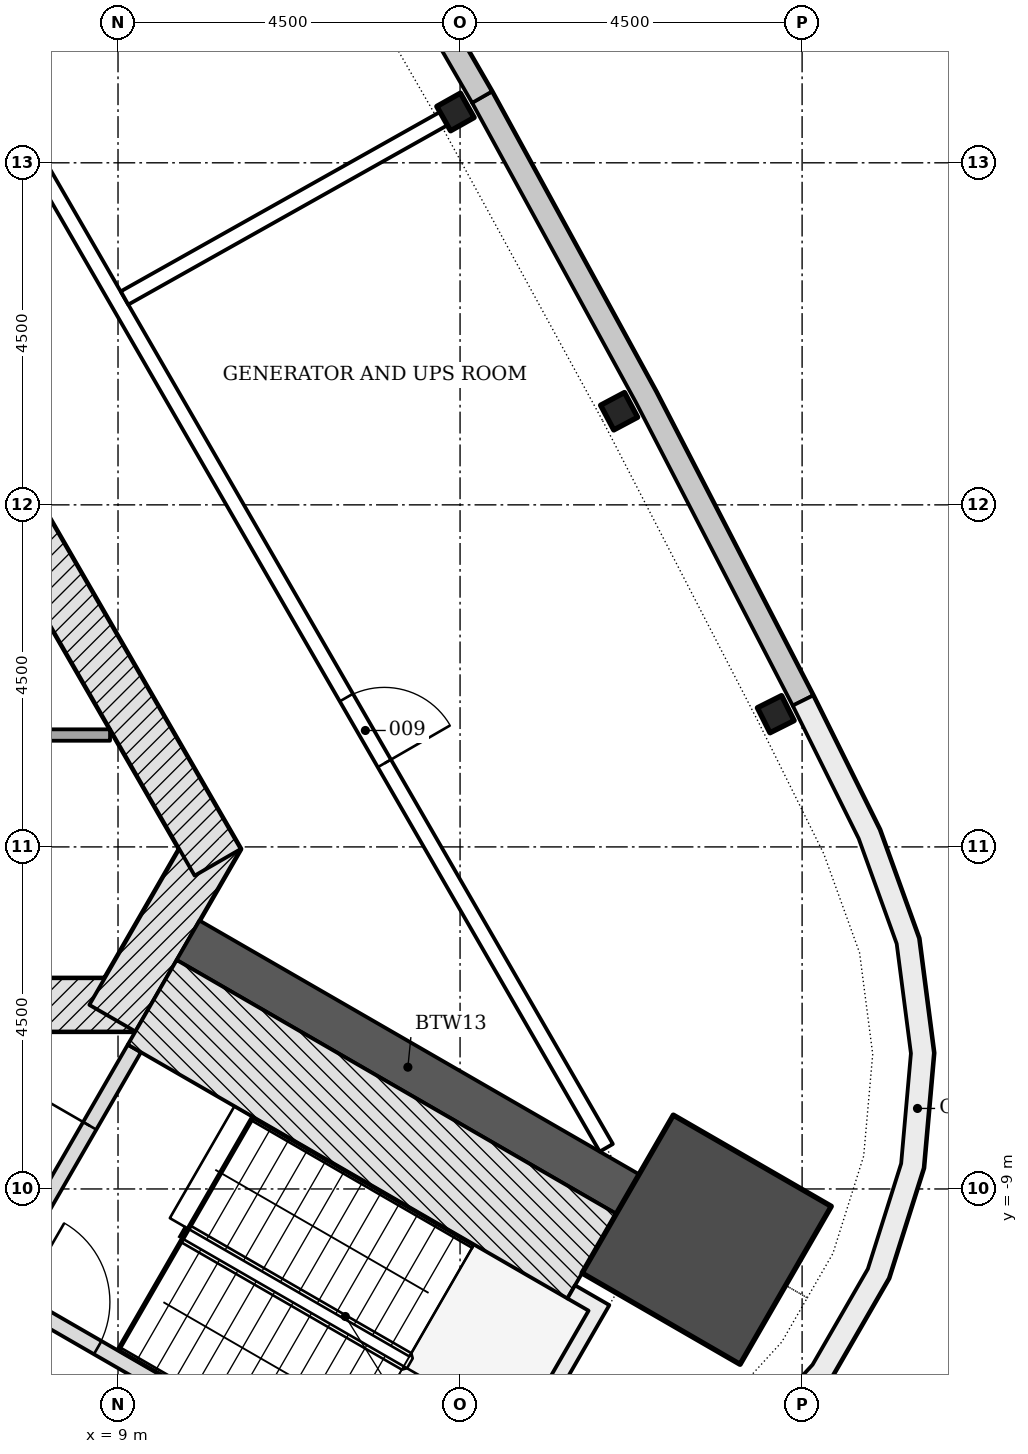
"""IFC4 building model, lengths in metres.
Left out: names, types, materials, properties, quantities, classifications, styles, units other than length and angle.
Written with IfcOpenShell. Run it as: python <this file> out.ifc"""

import sys

from ifc_helpers import new_model, si_unit, direction, frame, frame_2d, origin, origin_2d, place, context, subcontext, project, spatial, polyline, rectangle, i_section, outline, extrude, element, fill, save


model = new_model("IFC4")
c1 = context("Model", 3, precision=1e-05, world=origin(), true_north=direction((0.0, 1.0)))
c2 = subcontext(c1, "Body", "Model", "MODEL_VIEW")
j1 = project(units=[si_unit("LENGTHUNIT", "METRE"), si_unit("PLANEANGLEUNIT", "RADIAN")], contexts=[c1])
p1 = place(None, origin())
s1 = spatial("IfcSite", under=j1, at=p1, CompositionType="ELEMENT")
p2 = place(p1, origin())
s2 = spatial("IfcBuilding", under=s1, at=p2, CompositionType="ELEMENT")
p3 = place(p2, frame((0.0, 0.0, 284.1)))
s3 = spatial("IfcBuildingStorey", under=s2, at=p3, CompositionType="ELEMENT", Elevation=284.1)
p4 = place(p3, frame((-9.229, -6.578, -0.25), z_axis=(0.0, 0.0, 1.0), x_axis=(1.0, 0.0, 0.0)))
e1 = element("IfcWall", 1, at=p4, inside=s3, PredefinedType="SHEAR", context=c2, shape_type="SweptSolid", body=[
    extrude(rectangle(XDim=18.458, YDim=0.7, at=frame_2d((9.229, 0.0))), origin(), (0.0, 0.0, 1.0), 4.5),
])
p5 = place(p4, frame((8.7, 0.0, 0.25)))
e2 = element("IfcOpeningElement", 2, at=p5, cuts=e1, PredefinedType="OPENING", context=c2, shape_type="SweptSolid", body=[
    extrude(rectangle(XDim=1.0, YDim=2.1, at=frame_2d((0.5, 1.05))), frame((0.0, 0.36, 0.0), z_axis=(0.0, -1.0, 0.0), x_axis=(1.0, 0.0, 0.0)), (0.0, 0.0, 1.0), 0.72),
])
p6 = place(p4, frame((3.99, 0.0, 0.25)))
e3 = element("IfcOpeningElement", 3, at=p6, cuts=e1, PredefinedType="OPENING", context=c2, shape_type="SweptSolid", body=[
    extrude(rectangle(XDim=0.9, YDim=2.1, at=frame_2d((0.45, 1.05))), frame((0.0, 0.36, 0.0), z_axis=(0.0, -1.0, 0.0), x_axis=(1.0, 0.0, 0.0)), (0.0, 0.0, 1.0), 0.72),
])
p7 = place(p4, frame((13.539, 0.0, 0.25)))
e4 = element("IfcOpeningElement", 4, at=p7, cuts=e1, PredefinedType="OPENING", context=c2, shape_type="SweptSolid", body=[
    extrude(rectangle(XDim=0.9, YDim=2.1, at=frame_2d((0.45, 1.05))), frame((0.0, 0.36, 0.0), z_axis=(0.0, -1.0, 0.0), x_axis=(1.0, 0.0, 0.0)), (0.0, 0.0, 1.0), 0.72),
])
p8 = place(p3, frame((8.926, -6.753, -0.25), z_axis=(0.0, 0.0, 1.0), x_axis=(0.500042739161, 0.866000726912, 0.0)))
e5 = element("IfcWall", 5, at=p8, inside=s3, PredefinedType="SHEAR", context=c2, shape_type="SweptSolid", body=[
    extrude(rectangle(XDim=2.771, YDim=0.7, at=frame_2d((1.386, 0.0))), origin(), (0.0, 0.0, 1.0), 4.5),
])
p9 = place(p3, frame((10.311, -4.703, -0.25), z_axis=(0.0, 0.0, 1.0), x_axis=(-0.500001446645, 0.866024568562, 0.0)))
e6 = element("IfcWall", 6, at=p9, inside=s3, PredefinedType="SHEAR", context=c2, shape_type="SweptSolid", body=[
    extrude(rectangle(XDim=18.458, YDim=0.7, at=frame_2d((9.229, 0.0))), origin(), (0.0, 0.0, 1.0), 4.5),
])
p10 = place(p3, frame((9.922, -5.728, -0.25), z_axis=(0.0, 0.0, 1.0), x_axis=(0.866032176823, -0.499988268569, 0.0)))
e7 = element("IfcWall", 7, at=p10, inside=s3, PredefinedType="SHEAR", context=c2, shape_type="SweptSolid", body=[
    extrude(rectangle(XDim=6.678, YDim=0.6, at=frame_2d((3.339, 0.0))), origin(), (0.0, 0.0, 1.0), 4.5),
])
p11 = place(p3, frame((16.745, -9.667, -0.25), z_axis=(0.0, 0.0, 1.0), x_axis=(0.866025403784, -0.5, 0.0)))
e8 = element("IfcColumn", 8, at=p11, inside=s3, PredefinedType="COLUMN", context=c2, shape_type="SweptSolid", body=[
    extrude(rectangle(XDim=2.4, YDim=2.4, at=origin_2d()), origin(), (0.0, 0.0, 1.0), 4.5),
])
for number, where, z_axis, x_axis in (
    (9, (17.654, -2.754, -0.25), (0.0, 0.0, 1.0), (-0.449, 0.894, 0.0)),
    (10, (15.593, 1.232, -0.25), (0.0, 0.0, 1.0), (-0.47, 0.883, 0.0)),
    (11, (13.44, 5.169, -0.25), (0.0, 0.0, 1.0), (-0.49, 0.872, 0.0)),
):
    element("IfcColumn", number, at=place(p3, frame(where, z_axis=z_axis, x_axis=x_axis)), inside=s3, PredefinedType="COLUMN", context=c2, shape_type="SweptSolid", body=[
        extrude(i_section(OverallWidth=0.368, OverallDepth=0.356, WebThickness=0.011, FlangeThickness=0.018, FilletRadius=0.015, at=origin_2d()), origin(), (0.0, 0.0, 1.0), 4.5),
    ])
p12 = place(p3, origin())
e12 = element("IfcWall", 12, at=p12, inside=s3, PredefinedType="NOTDEFINED", context=c2, shape_type="SweptSolid", body=[
    extrude(outline(polyline([(18.145, -2.507), (16.078, 1.49), (13.919, 5.438), (13.656, 5.294), (15.813, 1.349), (17.878, -2.645), (18.145, -2.507)])), origin(), (0.0, 0.0, 1.0), 4.25),
])
p13 = place(p3, origin())
e13 = element("IfcWall", 13, at=p13, inside=s3, PredefinedType="NOTDEFINED", context=c2, shape_type="SweptSolid", body=[
    extrude(outline(polyline([(13.919, 5.438), (11.669, 9.335), (11.409, 9.185), (13.659, 5.288), (13.919, 5.438)])), origin(), (0.0, 0.0, 1.0), 1.2),
])
p14 = place(p3, origin())
e14 = element("IfcWall", 14, at=p14, inside=s3, PredefinedType="NOTDEFINED", context=c2, shape_type="SweptSolid", body=[
    extrude(outline(polyline([(11.244, -14.46), (13.211, -14.336), (14.708, -14.069), (16.111, -13.485), (17.355, -12.611), (18.381, -11.49), (19.141, -10.174), (19.599, -8.724), (19.733, -7.21), (19.538, -5.703), (19.021, -4.273), (18.145, -2.507), (17.876, -2.64), (18.745, -4.391), (19.244, -5.774), (19.432, -7.216), (19.303, -8.665), (18.865, -10.052), (18.138, -11.312), (17.156, -12.385), (15.965, -13.22), (14.623, -13.779), (13.176, -14.038), (11.225, -14.161), (11.244, -14.46)])), origin(), (0.0, 0.0, 1.0), 4.25),
])
p15 = place(p3, frame((1.071, -3.028, 0.0), z_axis=(0.0, 0.0, 1.0), x_axis=(1.0, 0.0, 0.0)))
e15 = element("IfcWall", 15, at=p15, inside=s3, PredefinedType="PARTITIONING", context=c2, shape_type="SweptSolid", body=[
    extrude(rectangle(XDim=7.824, YDim=0.15, at=frame_2d((3.912, 0.0))), origin(), (0.0, 0.0, 1.0), 4.25),
])
p16 = place(p3, frame((7.44, -10.226, -0.25), z_axis=(0.0, 0.0, 1.0), x_axis=(0.500022077904, 0.866012656725, 0.0)))
e16 = element("IfcWall", 16, at=p16, inside=s3, PredefinedType="SHEAR", context=c2, shape_type="SweptSolid", body=[
    extrude(rectangle(XDim=3.55, YDim=0.2, at=frame_2d((1.775, 0.0))), origin(), (0.0, 0.0, 1.0), 4.5),
])
p17 = place(p16, frame((1.175, 0.0, 0.25)))
e17 = element("IfcOpeningElement", 17, at=p17, cuts=e16, PredefinedType="OPENING", context=c2, shape_type="SweptSolid", body=[
    extrude(rectangle(XDim=1.2, YDim=2.1, at=frame_2d((0.6, 1.05))), frame((0.0, 0.11, 0.0), z_axis=(0.0, -1.0, 0.0), x_axis=(1.0, 0.0, 0.0)), (0.0, 0.0, 1.0), 0.22),
])
p18 = place(p3, frame((7.304, -10.262, -0.25), z_axis=(0.0, 0.0, 1.0), x_axis=(0.866026594901, -0.49999793692, 0.0)))
e18 = element("IfcWall", 18, at=p18, inside=s3, PredefinedType="SHEAR", context=c2, shape_type="SweptSolid", body=[
    extrude(rectangle(XDim=5.6, YDim=0.2, at=frame_2d((2.8, 0.0))), origin(), (0.0, 0.0, 1.0), 4.5),
])
p19 = place(p18, frame((0.45, 0.0, 0.25)))
e19 = element("IfcOpeningElement", 19, at=p19, cuts=e18, PredefinedType="OPENING", context=c2, shape_type="SweptSolid", body=[
    extrude(rectangle(XDim=1.2, YDim=2.1, at=frame_2d((0.6, 1.05))), frame((0.0, 0.11, 0.0), z_axis=(0.0, -1.0, 0.0), x_axis=(1.0, 0.0, 0.0)), (0.0, 0.0, 1.0), 0.22),
])
p20 = place(p3, frame((9.45, -6.545, -0.25), z_axis=(0.0, 0.0, 1.0), x_axis=(0.866016347338, -0.500015685897, 0.0)))
e20 = element("IfcWall", 20, at=p20, inside=s3, PredefinedType="SHEAR", context=c2, shape_type="SweptSolid", body=[
    extrude(rectangle(XDim=6.678, YDim=1.286, at=frame_2d((3.339, 0.0))), origin(), (0.0, 0.0, 1.0), 4.5),
])
p21 = place(p3, frame((0.0, 0.0, -0.25)))
e21 = element("IfcWall", 21, at=p21, inside=s3, PredefinedType="SHEAR", context=c2, shape_type="SweptSolid", body=[
    extrude(outline(polyline([(12.104, -13.149), (14.289, -12.563), (15.464, -10.528), (15.013, -10.268), (14.913, -10.441), (15.191, -10.601), (14.157, -12.392), (12.132, -12.934), (12.204, -12.976), (12.204, -12.976), (12.204, -12.976), (12.204, -12.976), (12.204, -12.976), (12.204, -12.976), (12.204, -12.976), (12.204, -12.976), (12.204, -12.976), (12.204, -12.976), (12.204, -12.976), (12.204, -12.976), (12.204, -12.976), (12.204, -12.976), (12.204, -12.976), (12.204, -12.976), (12.204, -12.976), (12.104, -13.149)])), origin(), (0.0, 0.0, 1.0), 4.5),
])
p22 = place(p3, frame((5.455, 8.808, 0.0), z_axis=(0.0, 0.0, 1.0), x_axis=(0.499996641012, -0.866027343088, 0.0)))
e22 = element("IfcWall", 22, at=p22, inside=s3, PredefinedType="PARTITIONING", context=c2, shape_type="SweptSolid", body=[
    extrude(rectangle(XDim=19.937, YDim=0.2, at=frame_2d((9.969, 0.0))), origin(), (0.0, 0.0, 1.0), 3.702),
])
p23 = place(p22, frame((13.097, 0.0, 0.0)))
e23 = element("IfcOpeningElement", 23, at=p23, cuts=e22, PredefinedType="OPENING", context=c2, shape_type="SweptSolid", body=[
    extrude(rectangle(XDim=1.0, YDim=2.1, at=frame_2d((0.5, 1.05))), frame((0.0, 0.11, 0.0), z_axis=(0.0, -1.0, 0.0), x_axis=(1.0, 0.0, 0.0)), (0.0, 0.0, 1.0), 0.22),
])
p24 = place(p22, frame((2.443, 0.0, 0.0)))
e24 = element("IfcOpeningElement", 24, at=p24, cuts=e22, PredefinedType="OPENING", context=c2, shape_type="SweptSolid", body=[
    extrude(rectangle(XDim=1.0, YDim=2.1, at=frame_2d((0.5, 1.05))), frame((0.0, 0.11, 0.0), z_axis=(0.0, -1.0, 0.0), x_axis=(1.0, 0.0, 0.0)), (0.0, 0.0, 1.0), 0.22),
])
p25 = place(p3, frame((9.086, 2.722, 0.0), z_axis=(0.0, 0.0, 1.0), x_axis=(0.87175044705, 0.489950158759, 0.0)))
e25 = element("IfcWall", 25, at=p25, inside=s3, PredefinedType="PARTITIONING", context=c2, shape_type="SweptSolid", body=[
    extrude(rectangle(XDim=4.844, YDim=0.2, at=frame_2d((2.422, 0.0))), origin(), (0.0, 0.0, 1.0), 3.702),
])
p26 = place(p17, origin())
e26 = element("IfcDoor", 26, at=p26, inside=s3, OperationType="SINGLE_SWING_RIGHT", PredefinedType="DOOR", context=c2, shape_type="SweptSolid", body=[
    extrude(rectangle(XDim=1.2, YDim=2.1, at=frame_2d((0.6, 1.05))), frame((0.0, 0.025, 0.0), z_axis=(0.0, -1.0, 0.0), x_axis=(1.0, 0.0, 0.0)), (0.0, 0.0, 1.0), 0.05),
])
fill(e17, e26)
p27 = place(p19, origin())
e27 = element("IfcDoor", 27, at=p27, inside=s3, OperationType="SINGLE_SWING_LEFT", PredefinedType="DOOR", context=c2, shape_type="SweptSolid", body=[
    extrude(rectangle(XDim=1.2, YDim=2.1, at=frame_2d((0.6, 1.05))), frame((0.0, 0.025, 0.0), z_axis=(0.0, -1.0, 0.0), x_axis=(1.0, 0.0, 0.0)), (0.0, 0.0, 1.0), 0.05),
])
fill(e19, e27)
p28 = place(p23, origin())
e28 = element("IfcDoor", 28, at=p28, inside=s3, OperationType="SINGLE_SWING_RIGHT", PredefinedType="DOOR", context=c2, shape_type="SweptSolid", body=[
    extrude(rectangle(XDim=1.0, YDim=2.1, at=frame_2d((0.5, 1.05))), frame((0.0, 0.025, 0.0), z_axis=(0.0, -1.0, 0.0), x_axis=(1.0, 0.0, 0.0)), (0.0, 0.0, 1.0), 0.05),
])
fill(e23, e28)
save(model, sys.argv[1])
